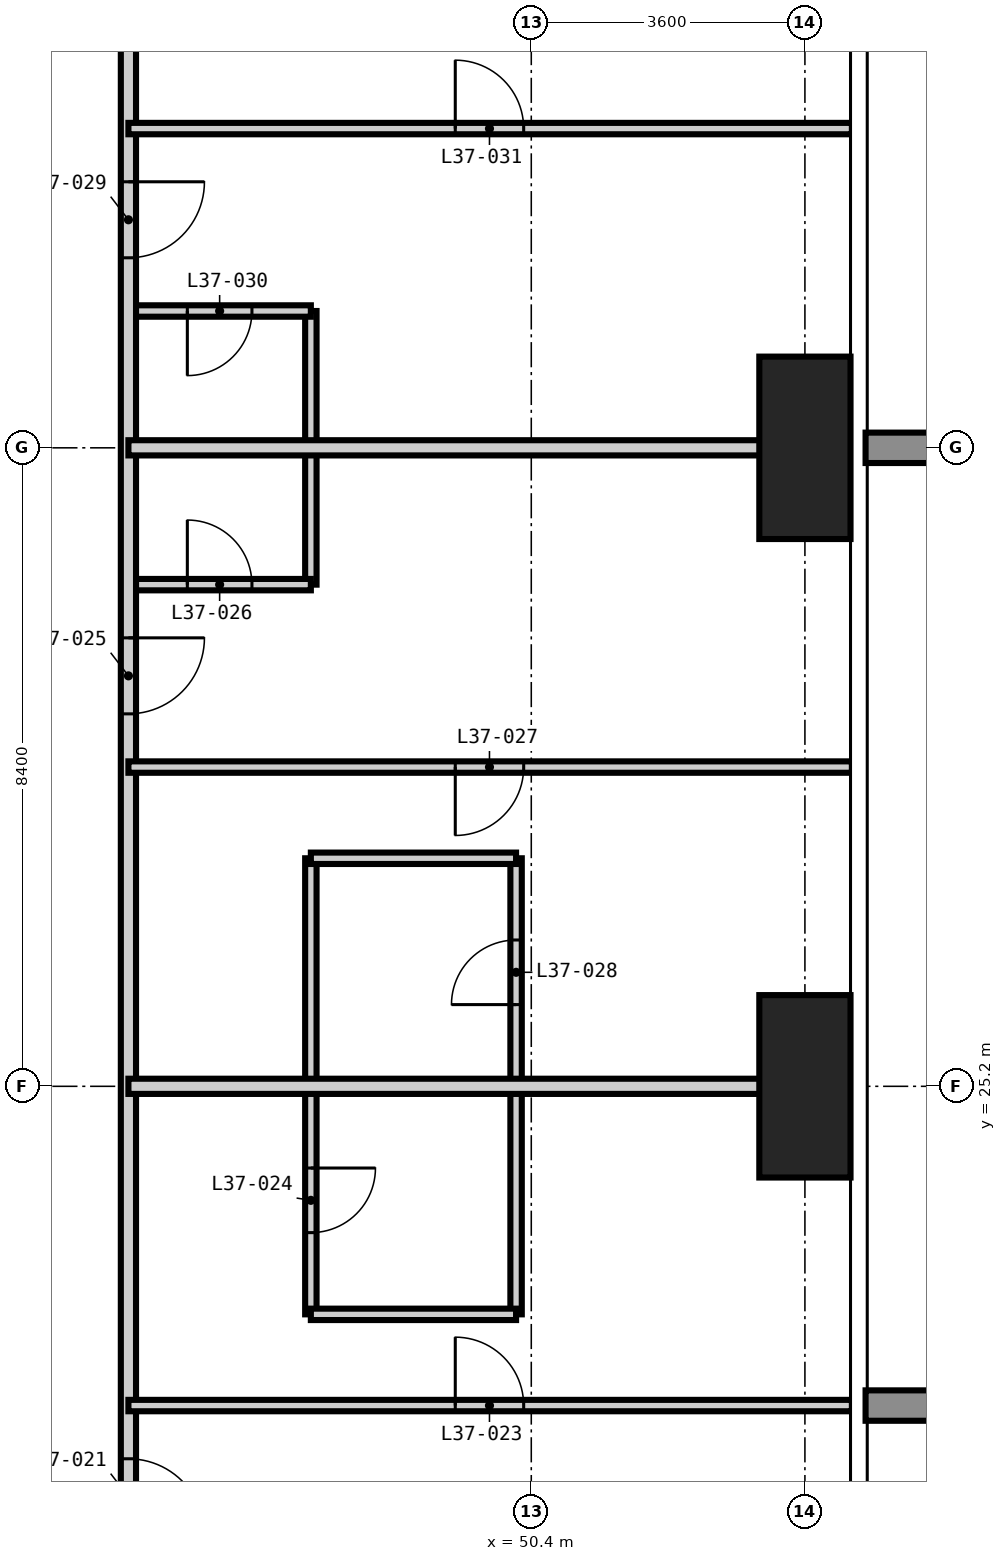
"""IFC4 building model, lengths in metres.
Left out: names, types, materials, properties, quantities, classifications, styles, units other than length and angle.
Written with IfcOpenShell. Run it as: python <this file> out.ifc"""

import sys

from ifc_helpers import new_model, si_unit, direction, frame, frame_2d, origin, origin_2d, place, context, subcontext, project, spatial, rectangle, extrude, element, fill, save


model = new_model("IFC4")
c1 = context("Model", 3, precision=1e-05, world=origin(), true_north=direction((0.0, 1.0)))
c2 = subcontext(c1, "Body", "Model", "MODEL_VIEW")
j1 = project(units=[si_unit("LENGTHUNIT", "METRE"), si_unit("PLANEANGLEUNIT", "RADIAN")], contexts=[c1])
p1 = place(None, origin())
s1 = spatial("IfcSite", under=j1, at=p1, CompositionType="ELEMENT")
p2 = place(p1, origin())
s2 = spatial("IfcBuilding", under=s1, at=p2, CompositionType="ELEMENT")
p3 = place(p2, frame((0.0, 0.0, 144.0)))
s3 = spatial("IfcBuildingStorey", under=s2, at=p3, CompositionType="ELEMENT", Elevation=144.0)
for number, where, z_axis, x_axis in (
    (1, (54.0, 25.2, -0.35), (0.0, 0.0, 1.0), (1.0, 0.0, 0.0)),
    (2, (54.0, 33.6, -0.35), (0.0, 0.0, 1.0), (1.0, 0.0, 0.0)),
):
    element("IfcColumn", number, at=place(p3, frame(where, z_axis=z_axis, x_axis=x_axis)), inside=s3, PredefinedType="COLUMN", context=c2, shape_type="SweptSolid", body=[
        extrude(rectangle(XDim=1.2, YDim=2.4, at=origin_2d()), origin(), (0.0, 0.0, 1.0), 3.6),
    ])
p4 = place(p3, frame((47.5, 22.2, 0.0), z_axis=(0.0, 0.0, 1.0), x_axis=(0.0, 1.0, 0.0)))
e3 = element("IfcWall", 3, at=p4, inside=s3, PredefinedType="PARTITIONING", context=c2, shape_type="SweptSolid", body=[
    extrude(rectangle(XDim=6.0, YDim=0.15, at=frame_2d((3.0, 0.0))), origin(), (0.0, 0.0, 1.0), 3.25),
])
p5 = place(p4, frame((1.075, 0.0, 0.0)))
e4 = element("IfcOpeningElement", 4, at=p5, cuts=e3, PredefinedType="OPENING", context=c2, shape_type="SweptSolid", body=[
    extrude(rectangle(XDim=0.85, YDim=2.1, at=frame_2d((0.425, 1.05))), frame((0.0, 0.085, 0.0), z_axis=(0.0, -1.0, 0.0), x_axis=(1.0, 0.0, 0.0)), (0.0, 0.0, 1.0), 0.17),
])
p6 = place(p3, frame((47.5, 31.8, 0.0), z_axis=(0.0, 0.0, 1.0), x_axis=(0.0, 1.0, 0.0)))
e5 = element("IfcWall", 5, at=p6, inside=s3, PredefinedType="PARTITIONING", context=c2, shape_type="SweptSolid", body=[
    extrude(rectangle(XDim=3.6, YDim=0.15, at=frame_2d((1.8, 0.0))), origin(), (0.0, 0.0, 1.0), 3.25),
])
p7 = place(p3, frame((50.2, 22.2, 0.0), z_axis=(0.0, 0.0, 1.0), x_axis=(0.0, 1.0, 0.0)))
e6 = element("IfcWall", 6, at=p7, inside=s3, PredefinedType="PARTITIONING", context=c2, shape_type="SweptSolid", body=[
    extrude(rectangle(XDim=6.0, YDim=0.15, at=frame_2d((3.0, 0.0))), origin(), (0.0, 0.0, 1.0), 3.25),
])
p8 = place(p7, frame((4.075, 0.0, 0.0)))
e7 = element("IfcOpeningElement", 7, at=p8, cuts=e6, PredefinedType="OPENING", context=c2, shape_type="SweptSolid", body=[
    extrude(rectangle(XDim=0.85, YDim=2.1, at=frame_2d((0.425, 1.05))), frame((0.0, 0.085, 0.0), z_axis=(0.0, -1.0, 0.0), x_axis=(1.0, 0.0, 0.0)), (0.0, 0.0, 1.0), 0.17),
])
for number, where, z_axis, x_axis in (
    (8, (47.5, 22.2, 0.0), (0.0, 0.0, 1.0), (1.0, 0.0, 0.0)),
    (9, (47.5, 28.2, 0.0), (0.0, 0.0, 1.0), (1.0, 0.0, 0.0)),
):
    element("IfcWall", number, at=place(p3, frame(where, z_axis=z_axis, x_axis=x_axis)), inside=s3, PredefinedType="PARTITIONING", context=c2, shape_type="SweptSolid", body=[
        extrude(rectangle(XDim=2.7, YDim=0.15, at=frame_2d((1.35, 0.0))), origin(), (0.0, 0.0, 1.0), 3.25),
    ])
p9 = place(p3, frame((45.1, 31.8, 0.0), z_axis=(0.0, 0.0, 1.0), x_axis=(1.0, 0.0, 0.0)))
e10 = element("IfcWall", 10, at=p9, inside=s3, PredefinedType="PARTITIONING", context=c2, shape_type="SweptSolid", body=[
    extrude(rectangle(XDim=2.4, YDim=0.15, at=frame_2d((1.2, 0.0))), origin(), (0.0, 0.0, 1.0), 3.25),
])
p10 = place(p9, frame((0.775, 0.0, 0.0)))
e11 = element("IfcOpeningElement", 11, at=p10, cuts=e10, PredefinedType="OPENING", context=c2, shape_type="SweptSolid", body=[
    extrude(rectangle(XDim=0.85, YDim=2.1, at=frame_2d((0.425, 1.05))), frame((0.0, 0.085, 0.0), z_axis=(0.0, -1.0, 0.0), x_axis=(1.0, 0.0, 0.0)), (0.0, 0.0, 1.0), 0.17),
])
p11 = place(p3, frame((45.1, 35.4, 0.0), z_axis=(0.0, 0.0, 1.0), x_axis=(1.0, 0.0, 0.0)))
e12 = element("IfcWall", 12, at=p11, inside=s3, PredefinedType="PARTITIONING", context=c2, shape_type="SweptSolid", body=[
    extrude(rectangle(XDim=2.4, YDim=0.15, at=frame_2d((1.2, 0.0))), origin(), (0.0, 0.0, 1.0), 3.25),
])
p12 = place(p11, frame((0.775, 0.0, 0.0)))
e13 = element("IfcOpeningElement", 13, at=p12, cuts=e12, PredefinedType="OPENING", context=c2, shape_type="SweptSolid", body=[
    extrude(rectangle(XDim=0.85, YDim=2.1, at=frame_2d((0.425, 1.05))), frame((0.0, 0.085, 0.0), z_axis=(0.0, -1.0, 0.0), x_axis=(1.0, 0.0, 0.0)), (0.0, 0.0, 1.0), 0.17),
])
p13 = place(p3, frame((45.1, 44.5, 0.0), z_axis=(0.0, 0.0, 1.0), x_axis=(0.0, -1.0, 0.0)))
e14 = element("IfcWall", 14, at=p13, inside=s3, PredefinedType="PARTITIONING", context=c2, shape_type="SweptSolid", body=[
    extrude(rectangle(XDim=31.4, YDim=0.2, at=frame_2d((15.7, 0.0))), origin(), (0.0, 0.0, 1.0), 3.25),
])
p14 = place(p13, frame((24.2, 0.0, 0.0)))
e15 = element("IfcOpeningElement", 15, at=p14, cuts=e14, PredefinedType="OPENING", context=c2, shape_type="SweptSolid", body=[
    extrude(rectangle(XDim=1.0, YDim=2.2, at=frame_2d((0.5, 1.1))), frame((0.0, 0.11, 0.0), z_axis=(0.0, -1.0, 0.0), x_axis=(1.0, 0.0, 0.0)), (0.0, 0.0, 1.0), 0.22),
])
p15 = place(p13, frame((13.4, 0.0, 0.0)))
e16 = element("IfcOpeningElement", 16, at=p15, cuts=e14, PredefinedType="OPENING", context=c2, shape_type="SweptSolid", body=[
    extrude(rectangle(XDim=1.0, YDim=2.2, at=frame_2d((0.5, 1.1))), frame((0.0, 0.11, 0.0), z_axis=(0.0, -1.0, 0.0), x_axis=(1.0, 0.0, 0.0)), (0.0, 0.0, 1.0), 0.22),
])
p16 = place(p13, frame((7.4, 0.0, 0.0)))
e17 = element("IfcOpeningElement", 17, at=p16, cuts=e14, PredefinedType="OPENING", context=c2, shape_type="SweptSolid", body=[
    extrude(rectangle(XDim=1.0, YDim=2.2, at=frame_2d((0.5, 1.1))), frame((0.0, 0.11, 0.0), z_axis=(0.0, -1.0, 0.0), x_axis=(1.0, 0.0, 0.0)), (0.0, 0.0, 1.0), 0.22),
])
p17 = place(p13, frame((29.05, 0.0, 0.0)))
e18 = element("IfcOpeningElement", 18, at=p17, cuts=e14, PredefinedType="OPENING", context=c2, shape_type="SweptSolid", body=[
    extrude(rectangle(XDim=1.0, YDim=2.2, at=frame_2d((0.5, 1.1))), frame((0.0, 0.11, 0.0), z_axis=(0.0, -1.0, 0.0), x_axis=(1.0, 0.0, 0.0)), (0.0, 0.0, 1.0), 0.22),
])
p18 = place(p13, frame((0.75, 0.0, 0.0)))
e19 = element("IfcOpeningElement", 19, at=p18, cuts=e14, PredefinedType="OPENING", context=c2, shape_type="SweptSolid", body=[
    extrude(rectangle(XDim=1.0, YDim=2.2, at=frame_2d((0.5, 1.1))), frame((0.0, 0.11, 0.0), z_axis=(0.0, -1.0, 0.0), x_axis=(1.0, 0.0, 0.0)), (0.0, 0.0, 1.0), 0.22),
])
for number, where, z_axis, x_axis in (
    (20, (45.1, 25.2, 0.0), (0.0, 0.0, 1.0), (1.0, 0.0, 0.0)),
    (21, (45.1, 33.6, 0.0), (0.0, 0.0, 1.0), (1.0, 0.0, 0.0)),
):
    element("IfcWall", number, at=place(p3, frame(where, z_axis=z_axis, x_axis=x_axis)), inside=s3, PredefinedType="PARTITIONING", context=c2, shape_type="SweptSolid", body=[
        extrude(rectangle(XDim=9.518, YDim=0.2, at=frame_2d((4.759, 0.0))), origin(), (0.0, 0.0, 1.0), 3.25),
    ])
p19 = place(p3, frame((45.1, 21.0, 0.0), z_axis=(0.0, 0.0, 1.0), x_axis=(1.0, 0.0, 0.0)))
e22 = element("IfcWall", 22, at=p19, inside=s3, PredefinedType="PARTITIONING", context=c2, shape_type="SweptSolid", body=[
    extrude(rectangle(XDim=9.518, YDim=0.15, at=frame_2d((4.759, 0.0))), origin(), (0.0, 0.0, 1.0), 3.25),
])
p20 = place(p19, frame((4.3, 0.0, 0.0)))
e23 = element("IfcOpeningElement", 23, at=p20, cuts=e22, PredefinedType="OPENING", context=c2, shape_type="SweptSolid", body=[
    extrude(rectangle(XDim=0.9, YDim=2.1, at=frame_2d((0.45, 1.05))), frame((0.0, 0.085, 0.0), z_axis=(0.0, -1.0, 0.0), x_axis=(1.0, 0.0, 0.0)), (0.0, 0.0, 1.0), 0.17),
])
p21 = place(p3, frame((45.1, 29.4, 0.0), z_axis=(0.0, 0.0, 1.0), x_axis=(1.0, 0.0, 0.0)))
e24 = element("IfcWall", 24, at=p21, inside=s3, PredefinedType="PARTITIONING", context=c2, shape_type="SweptSolid", body=[
    extrude(rectangle(XDim=9.518, YDim=0.15, at=frame_2d((4.759, 0.0))), origin(), (0.0, 0.0, 1.0), 3.25),
])
p22 = place(p21, frame((4.3, 0.0, 0.0)))
e25 = element("IfcOpeningElement", 25, at=p22, cuts=e24, PredefinedType="OPENING", context=c2, shape_type="SweptSolid", body=[
    extrude(rectangle(XDim=0.9, YDim=2.1, at=frame_2d((0.45, 1.05))), frame((0.0, 0.085, 0.0), z_axis=(0.0, -1.0, 0.0), x_axis=(1.0, 0.0, 0.0)), (0.0, 0.0, 1.0), 0.17),
])
p23 = place(p3, frame((45.1, 37.8, 0.0), z_axis=(0.0, 0.0, 1.0), x_axis=(1.0, 0.0, 0.0)))
e26 = element("IfcWall", 26, at=p23, inside=s3, PredefinedType="PARTITIONING", context=c2, shape_type="SweptSolid", body=[
    extrude(rectangle(XDim=9.518, YDim=0.15, at=frame_2d((4.759, 0.0))), origin(), (0.0, 0.0, 1.0), 3.25),
])
p24 = place(p23, frame((4.3, 0.0, 0.0)))
e27 = element("IfcOpeningElement", 27, at=p24, cuts=e26, PredefinedType="OPENING", context=c2, shape_type="SweptSolid", body=[
    extrude(rectangle(XDim=0.9, YDim=2.1, at=frame_2d((0.45, 1.05))), frame((0.0, 0.085, 0.0), z_axis=(0.0, -1.0, 0.0), x_axis=(1.0, 0.0, 0.0)), (0.0, 0.0, 1.0), 0.17),
])
p25 = place(p14, origin())
e28 = element("IfcDoor", 28, at=p25, inside=s3, OperationType="SINGLE_SWING_RIGHT", PredefinedType="DOOR", context=c2, shape_type="SweptSolid", body=[
    extrude(rectangle(XDim=1.0, YDim=2.2, at=frame_2d((0.5, 1.1))), frame((0.0, 0.025, 0.0), z_axis=(0.0, -1.0, 0.0), x_axis=(1.0, 0.0, 0.0)), (0.0, 0.0, 1.0), 0.05),
])
fill(e15, e28)
p26 = place(p20, origin())
e29 = element("IfcDoor", 29, at=p26, inside=s3, OperationType="SINGLE_SWING_LEFT", PredefinedType="DOOR", context=c2, shape_type="SweptSolid", body=[
    extrude(rectangle(XDim=0.9, YDim=2.1, at=frame_2d((0.45, 1.05))), frame((0.0, 0.025, 0.0), z_axis=(0.0, -1.0, 0.0), x_axis=(1.0, 0.0, 0.0)), (0.0, 0.0, 1.0), 0.05),
])
fill(e23, e29)
p27 = place(p5, frame((0.85, 0.0, 0.0), z_axis=(0.0, 0.0, 1.0), x_axis=(-1.0, 0.0, 0.0)))
e30 = element("IfcDoor", 30, at=p27, inside=s3, OperationType="SINGLE_SWING_LEFT", PredefinedType="DOOR", context=c2, shape_type="SweptSolid", body=[
    extrude(rectangle(XDim=0.85, YDim=2.1, at=frame_2d((0.425, 1.05))), frame((0.0, 0.025, 0.0), z_axis=(0.0, -1.0, 0.0), x_axis=(1.0, 0.0, 0.0)), (0.0, 0.0, 1.0), 0.05),
])
fill(e4, e30)
p28 = place(p15, origin())
e31 = element("IfcDoor", 31, at=p28, inside=s3, OperationType="SINGLE_SWING_LEFT", PredefinedType="DOOR", context=c2, shape_type="SweptSolid", body=[
    extrude(rectangle(XDim=1.0, YDim=2.2, at=frame_2d((0.5, 1.1))), frame((0.0, 0.025, 0.0), z_axis=(0.0, -1.0, 0.0), x_axis=(1.0, 0.0, 0.0)), (0.0, 0.0, 1.0), 0.05),
])
fill(e16, e31)
p29 = place(p10, origin())
e32 = element("IfcDoor", 32, at=p29, inside=s3, OperationType="SINGLE_SWING_LEFT", PredefinedType="DOOR", context=c2, shape_type="SweptSolid", body=[
    extrude(rectangle(XDim=0.85, YDim=2.1, at=frame_2d((0.425, 1.05))), frame((0.0, 0.025, 0.0), z_axis=(0.0, -1.0, 0.0), x_axis=(1.0, 0.0, 0.0)), (0.0, 0.0, 1.0), 0.05),
])
fill(e11, e32)
p30 = place(p22, frame((0.9, 0.0, 0.0), z_axis=(0.0, 0.0, 1.0), x_axis=(-1.0, 0.0, 0.0)))
e33 = element("IfcDoor", 33, at=p30, inside=s3, OperationType="SINGLE_SWING_RIGHT", PredefinedType="DOOR", context=c2, shape_type="SweptSolid", body=[
    extrude(rectangle(XDim=0.9, YDim=2.1, at=frame_2d((0.45, 1.05))), frame((0.0, 0.025, 0.0), z_axis=(0.0, -1.0, 0.0), x_axis=(1.0, 0.0, 0.0)), (0.0, 0.0, 1.0), 0.05),
])
fill(e25, e33)
p31 = place(p8, origin())
e34 = element("IfcDoor", 34, at=p31, inside=s3, OperationType="SINGLE_SWING_LEFT", PredefinedType="DOOR", context=c2, shape_type="SweptSolid", body=[
    extrude(rectangle(XDim=0.85, YDim=2.1, at=frame_2d((0.425, 1.05))), frame((0.0, 0.025, 0.0), z_axis=(0.0, -1.0, 0.0), x_axis=(1.0, 0.0, 0.0)), (0.0, 0.0, 1.0), 0.05),
])
fill(e7, e34)
p32 = place(p16, origin())
e35 = element("IfcDoor", 35, at=p32, inside=s3, OperationType="SINGLE_SWING_LEFT", PredefinedType="DOOR", context=c2, shape_type="SweptSolid", body=[
    extrude(rectangle(XDim=1.0, YDim=2.2, at=frame_2d((0.5, 1.1))), frame((0.0, 0.025, 0.0), z_axis=(0.0, -1.0, 0.0), x_axis=(1.0, 0.0, 0.0)), (0.0, 0.0, 1.0), 0.05),
])
fill(e17, e35)
p33 = place(p12, frame((0.85, 0.0, 0.0), z_axis=(0.0, 0.0, 1.0), x_axis=(-1.0, 0.0, 0.0)))
e36 = element("IfcDoor", 36, at=p33, inside=s3, OperationType="SINGLE_SWING_RIGHT", PredefinedType="DOOR", context=c2, shape_type="SweptSolid", body=[
    extrude(rectangle(XDim=0.85, YDim=2.1, at=frame_2d((0.425, 1.05))), frame((0.0, 0.025, 0.0), z_axis=(0.0, -1.0, 0.0), x_axis=(1.0, 0.0, 0.0)), (0.0, 0.0, 1.0), 0.05),
])
fill(e13, e36)
p34 = place(p24, origin())
e37 = element("IfcDoor", 37, at=p34, inside=s3, OperationType="SINGLE_SWING_LEFT", PredefinedType="DOOR", context=c2, shape_type="SweptSolid", body=[
    extrude(rectangle(XDim=0.9, YDim=2.1, at=frame_2d((0.45, 1.05))), frame((0.0, 0.025, 0.0), z_axis=(0.0, -1.0, 0.0), x_axis=(1.0, 0.0, 0.0)), (0.0, 0.0, 1.0), 0.05),
])
fill(e27, e37)
save(model, sys.argv[1])
